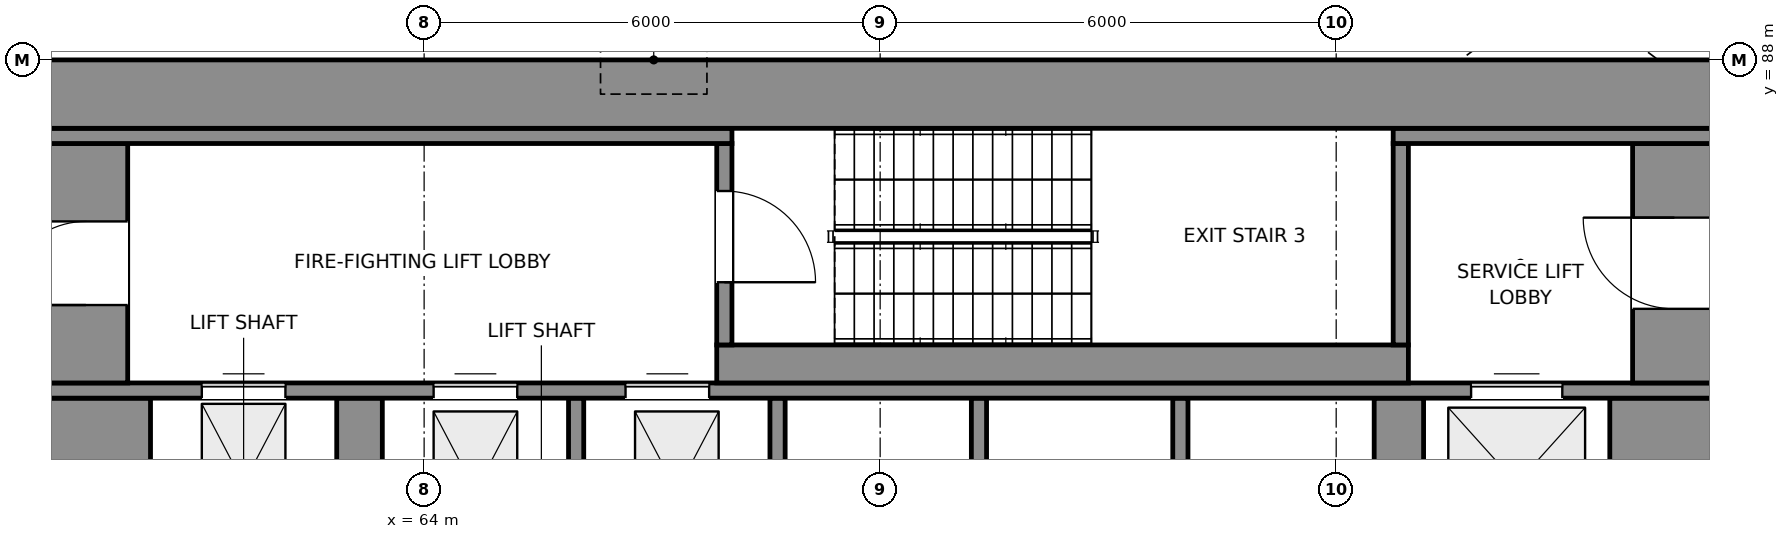
"""IFC4 building model, lengths in metres.
Left out: names, types, materials, properties, quantities, classifications, styles, units other than length and angle.
Written with IfcOpenShell. Run it as: python <this file> out.ifc"""

import sys

from ifc_helpers import new_model, si_unit, direction, frame, frame_2d, origin, place, context, subcontext, project, spatial, rectangle, extrude, element, fill, save


model = new_model("IFC4")
c1 = context("Model", 3, precision=1e-05, world=origin(), true_north=direction((0.0, 1.0)))
c2 = subcontext(c1, "Body", "Model", "MODEL_VIEW")
j1 = project(units=[si_unit("LENGTHUNIT", "METRE"), si_unit("PLANEANGLEUNIT", "RADIAN")], contexts=[c1])
p1 = place(None, origin())
s1 = spatial("IfcSite", under=j1, at=p1, CompositionType="ELEMENT")
p2 = place(p1, origin())
s2 = spatial("IfcBuilding", under=s1, at=p2, CompositionType="ELEMENT")
p3 = place(p2, frame((0.0, 0.0, 137.6)))
s3 = spatial("IfcBuildingStorey", under=s2, at=p3, CompositionType="ELEMENT", Elevation=137.6)
for number, where, z_axis, x_axis in (
    (1, (66.0, 81.1, 0.0), (0.0, 0.0, 1.0), (0.0, 1.0, 0.0)),
    (2, (68.65, 81.1, 0.0), (0.0, 0.0, 1.0), (0.0, 1.0, 0.0)),
    (3, (71.3, 81.1, 0.0), (0.0, 0.0, 1.0), (0.0, 1.0, 0.0)),
    (4, (73.95, 81.1, 0.0), (0.0, 0.0, 1.0), (0.0, 1.0, 0.0)),
):
    element("IfcWall", number, at=place(p3, frame(where, z_axis=z_axis, x_axis=x_axis)), inside=s3, PredefinedType="SHEAR", context=c2, shape_type="SweptSolid", body=[
        extrude(rectangle(XDim=2.45, YDim=0.2, at=frame_2d((1.225, 0.0))), origin(), (0.0, 0.0, 1.0), 5.0),
    ])
p4 = place(p3, frame((59.7, 81.3, 0.0), z_axis=(0.0, 0.0, 1.0), x_axis=(0.0, 1.0, 0.0)))
e5 = element("IfcWall", 5, at=p4, inside=s3, PredefinedType="SHEAR", context=c2, shape_type="SweptSolid", body=[
    extrude(rectangle(XDim=2.25, YDim=1.4, at=frame_2d((1.125, 0.0))), origin(), (0.0, 0.0, 1.0), 5.0),
])
p5 = place(p3, frame((63.15, 81.3, 0.0), z_axis=(0.0, 0.0, 1.0), x_axis=(0.0, 1.0, 0.0)))
e6 = element("IfcWall", 6, at=p5, inside=s3, PredefinedType="SHEAR", context=c2, shape_type="SweptSolid", body=[
    extrude(rectangle(XDim=2.25, YDim=0.6, at=frame_2d((1.125, 0.0))), origin(), (0.0, 0.0, 1.0), 5.0),
])
p6 = place(p3, frame((76.825, 81.3, 0.0), z_axis=(0.0, 0.0, 1.0), x_axis=(0.0, 1.0, 0.0)))
e7 = element("IfcWall", 7, at=p6, inside=s3, PredefinedType="SHEAR", context=c2, shape_type="SweptSolid", body=[
    extrude(rectangle(XDim=2.25, YDim=0.65, at=frame_2d((1.125, 0.0))), origin(), (0.0, 0.0, 1.0), 5.0),
])
p7 = place(p3, frame((80.3, 81.3, 0.0), z_axis=(0.0, 0.0, 1.0), x_axis=(0.0, 1.0, 0.0)))
e8 = element("IfcWall", 8, at=p7, inside=s3, PredefinedType="SHEAR", context=c2, shape_type="SweptSolid", body=[
    extrude(rectangle(XDim=2.25, YDim=1.4, at=frame_2d((1.125, 0.0))), origin(), (0.0, 0.0, 1.0), 5.0),
])
p8 = place(p3, frame((59.0, 83.65, 0.0), z_axis=(0.0, 0.0, 1.0), x_axis=(1.0, 0.0, 0.0)))
e9 = element("IfcWall", 9, at=p8, inside=s3, PredefinedType="SHEAR", context=c2, shape_type="SweptSolid", body=[
    extrude(rectangle(XDim=22.0, YDim=0.2, at=frame_2d((11.0, 0.0))), origin(), (0.0, 0.0, 1.0), 5.0),
])
p9 = place(p8, frame((5.125, 0.0, 0.0)))
e10 = element("IfcOpeningElement", 10, at=p9, cuts=e9, PredefinedType="OPENING", context=c2, shape_type="SweptSolid", body=[
    extrude(rectangle(XDim=1.1, YDim=2.1, at=frame_2d((0.55, 1.05))), frame((0.0, 0.11, 0.0), z_axis=(0.0, -1.0, 0.0), x_axis=(1.0, 0.0, 0.0)), (0.0, 0.0, 1.0), 0.22),
])
p10 = place(p8, frame((7.65, 0.0, 0.0)))
e11 = element("IfcOpeningElement", 11, at=p10, cuts=e9, PredefinedType="OPENING", context=c2, shape_type="SweptSolid", body=[
    extrude(rectangle(XDim=1.1, YDim=2.1, at=frame_2d((0.55, 1.05))), frame((0.0, 0.11, 0.0), z_axis=(0.0, -1.0, 0.0), x_axis=(1.0, 0.0, 0.0)), (0.0, 0.0, 1.0), 0.22),
])
p11 = place(p8, frame((18.775, 0.0, 0.0)))
e12 = element("IfcOpeningElement", 12, at=p11, cuts=e9, PredefinedType="OPENING", context=c2, shape_type="SweptSolid", body=[
    extrude(rectangle(XDim=1.2, YDim=2.1, at=frame_2d((0.6, 1.05))), frame((0.0, 0.11, 0.0), z_axis=(0.0, -1.0, 0.0), x_axis=(1.0, 0.0, 0.0)), (0.0, 0.0, 1.0), 0.22),
])
p12 = place(p8, frame((2.075, 0.0, 0.0)))
e13 = element("IfcOpeningElement", 13, at=p12, cuts=e9, PredefinedType="OPENING", context=c2, shape_type="SweptSolid", body=[
    extrude(rectangle(XDim=1.1, YDim=2.1, at=frame_2d((0.55, 1.05))), frame((0.0, 0.11, 0.0), z_axis=(0.0, -1.0, 0.0), x_axis=(1.0, 0.0, 0.0)), (0.0, 0.0, 1.0), 0.22),
])
p13 = place(p3, frame((59.55, 83.75, 0.0), z_axis=(0.0, 0.0, 1.0), x_axis=(0.0, 1.0, 0.0)))
e14 = element("IfcWall", 14, at=p13, inside=s3, PredefinedType="SHEAR", context=c2, shape_type="SweptSolid", body=[
    extrude(rectangle(XDim=3.15, YDim=1.1, at=frame_2d((1.575, 0.0))), origin(), (0.0, 0.0, 1.0), 5.0),
])
p14 = place(p13, frame((1.025, 0.0, 0.0)))
e15 = element("IfcOpeningElement", 15, at=p14, cuts=e14, PredefinedType="OPENING", context=c2, shape_type="SweptSolid", body=[
    extrude(rectangle(XDim=1.1, YDim=2.1, at=frame_2d((0.55, 1.05))), frame((0.0, 0.56, 0.0), z_axis=(0.0, -1.0, 0.0), x_axis=(1.0, 0.0, 0.0)), (0.0, 0.0, 1.0), 1.12),
])
p15 = place(p3, frame((67.85, 84.0, 0.0), z_axis=(0.0, 0.0, 1.0), x_axis=(1.0, 0.0, 0.0)))
e16 = element("IfcWall", 16, at=p15, inside=s3, PredefinedType="SHEAR", context=c2, shape_type="SweptSolid", body=[
    extrude(rectangle(XDim=9.1, YDim=0.5, at=frame_2d((4.55, 0.0))), origin(), (0.0, 0.0, 1.0), 5.0),
])
p16 = place(p3, frame((80.45, 83.75, 0.0), z_axis=(0.0, 0.0, 1.0), x_axis=(0.0, 1.0, 0.0)))
e17 = element("IfcWall", 17, at=p16, inside=s3, PredefinedType="SHEAR", context=c2, shape_type="SweptSolid", body=[
    extrude(rectangle(XDim=3.15, YDim=1.1, at=frame_2d((1.575, 0.0))), origin(), (0.0, 0.0, 1.0), 5.0),
])
p17 = place(p16, frame((0.975, 0.0, 0.0)))
e18 = element("IfcOpeningElement", 18, at=p17, cuts=e17, PredefinedType="OPENING", context=c2, shape_type="SweptSolid", body=[
    extrude(rectangle(XDim=1.2, YDim=2.1, at=frame_2d((0.6, 1.05))), frame((0.0, 0.56, 0.0), z_axis=(0.0, -1.0, 0.0), x_axis=(1.0, 0.0, 0.0)), (0.0, 0.0, 1.0), 1.12),
])
p18 = place(p3, frame((67.95, 84.25, 0.0), z_axis=(0.0, 0.0, 1.0), x_axis=(0.0, 1.0, 0.0)))
e19 = element("IfcWall", 19, at=p18, inside=s3, PredefinedType="SHEAR", context=c2, shape_type="SweptSolid", body=[
    extrude(rectangle(XDim=2.65, YDim=0.2, at=frame_2d((1.325, 0.0))), origin(), (0.0, 0.0, 1.0), 5.0),
])
p19 = place(p18, frame((0.825, 0.0, 0.0)))
e20 = element("IfcOpeningElement", 20, at=p19, cuts=e19, PredefinedType="OPENING", context=c2, shape_type="SweptSolid", body=[
    extrude(rectangle(XDim=1.2, YDim=2.1, at=frame_2d((0.6, 1.05))), frame((0.0, 0.11, 0.0), z_axis=(0.0, -1.0, 0.0), x_axis=(1.0, 0.0, 0.0)), (0.0, 0.0, 1.0), 0.22),
])
p20 = place(p3, frame((76.85, 84.25, 0.0), z_axis=(0.0, 0.0, 1.0), x_axis=(0.0, 1.0, 0.0)))
e21 = element("IfcWall", 21, at=p20, inside=s3, PredefinedType="SHEAR", context=c2, shape_type="SweptSolid", body=[
    extrude(rectangle(XDim=2.65, YDim=0.2, at=frame_2d((1.325, 0.0))), origin(), (0.0, 0.0, 1.0), 5.0),
])
p21 = place(p3, frame((59.0, 87.0, 0.0), z_axis=(0.0, 0.0, 1.0), x_axis=(1.0, 0.0, 0.0)))
e22 = element("IfcWall", 22, at=p21, inside=s3, PredefinedType="SHEAR", context=c2, shape_type="SweptSolid", body=[
    extrude(rectangle(XDim=9.05, YDim=0.2, at=frame_2d((4.525, 0.0))), origin(), (0.0, 0.0, 1.0), 5.0),
])
p22 = place(p3, frame((76.75, 87.0, 0.0), z_axis=(0.0, 0.0, 1.0), x_axis=(1.0, 0.0, 0.0)))
e23 = element("IfcWall", 23, at=p22, inside=s3, PredefinedType="SHEAR", context=c2, shape_type="SweptSolid", body=[
    extrude(rectangle(XDim=4.25, YDim=0.2, at=frame_2d((2.125, 0.0))), origin(), (0.0, 0.0, 1.0), 5.0),
])
p23 = place(p3, frame((59.0, 87.55, 0.0), z_axis=(0.0, 0.0, 1.0), x_axis=(1.0, 0.0, 0.0)))
e24 = element("IfcWall", 24, at=p23, inside=s3, PredefinedType="SHEAR", context=c2, shape_type="SweptSolid", body=[
    extrude(rectangle(XDim=22.0, YDim=0.9, at=frame_2d((11.0, 0.0))), origin(), (0.0, 0.0, 1.0), 5.0),
])
p24 = place(p19, frame((1.2, 0.0, 0.0), z_axis=(0.0, 0.0, 1.0), x_axis=(-1.0, 0.0, 0.0)))
e25 = element("IfcDoor", 25, at=p24, inside=s3, OperationType="SINGLE_SWING_RIGHT", PredefinedType="DOOR", context=c2, shape_type="SweptSolid", body=[
    extrude(rectangle(XDim=1.2, YDim=2.1, at=frame_2d((0.6, 1.05))), frame((0.0, 0.025, 0.0), z_axis=(0.0, -1.0, 0.0), x_axis=(1.0, 0.0, 0.0)), (0.0, 0.0, 1.0), 0.05),
])
fill(e20, e25)
p25 = place(p14, origin())
e26 = element("IfcDoor", 26, at=p25, inside=s3, OperationType="SINGLE_SWING_LEFT", PredefinedType="DOOR", context=c2, shape_type="SweptSolid", body=[
    extrude(rectangle(XDim=1.1, YDim=2.1, at=frame_2d((0.55, 1.05))), frame((0.0, 0.025, 0.0), z_axis=(0.0, -1.0, 0.0), x_axis=(1.0, 0.0, 0.0)), (0.0, 0.0, 1.0), 0.05),
])
fill(e15, e26)
p26 = place(p17, origin())
e27 = element("IfcDoor", 27, at=p26, inside=s3, OperationType="SINGLE_SWING_RIGHT", PredefinedType="DOOR", context=c2, shape_type="SweptSolid", body=[
    extrude(rectangle(XDim=1.2, YDim=2.1, at=frame_2d((0.6, 1.05))), frame((0.0, 0.025, 0.0), z_axis=(0.0, -1.0, 0.0), x_axis=(1.0, 0.0, 0.0)), (0.0, 0.0, 1.0), 0.05),
])
fill(e18, e27)
p27 = place(p9, origin())
e28 = element("IfcDoor", 28, at=p27, inside=s3, OperationType="DOUBLE_DOOR_SLIDING", PredefinedType="DOOR", context=c2, shape_type="SweptSolid", body=[
    extrude(rectangle(XDim=1.1, YDim=2.1, at=frame_2d((0.55, 1.05))), frame((0.0, 0.025, 0.0), z_axis=(0.0, -1.0, 0.0), x_axis=(1.0, 0.0, 0.0)), (0.0, 0.0, 1.0), 0.05),
])
fill(e10, e28)
p28 = place(p10, origin())
e29 = element("IfcDoor", 29, at=p28, inside=s3, OperationType="DOUBLE_DOOR_SLIDING", PredefinedType="DOOR", context=c2, shape_type="SweptSolid", body=[
    extrude(rectangle(XDim=1.1, YDim=2.1, at=frame_2d((0.55, 1.05))), frame((0.0, 0.025, 0.0), z_axis=(0.0, -1.0, 0.0), x_axis=(1.0, 0.0, 0.0)), (0.0, 0.0, 1.0), 0.05),
])
fill(e11, e29)
p29 = place(p11, origin())
e30 = element("IfcDoor", 30, at=p29, inside=s3, OperationType="DOUBLE_DOOR_SLIDING", PredefinedType="DOOR", context=c2, shape_type="SweptSolid", body=[
    extrude(rectangle(XDim=1.2, YDim=2.1, at=frame_2d((0.6, 1.05))), frame((0.0, 0.025, 0.0), z_axis=(0.0, -1.0, 0.0), x_axis=(1.0, 0.0, 0.0)), (0.0, 0.0, 1.0), 0.05),
])
fill(e12, e30)
p30 = place(p12, origin())
e31 = element("IfcDoor", 31, at=p30, inside=s3, OperationType="DOUBLE_DOOR_SLIDING", PredefinedType="DOOR", context=c2, shape_type="SweptSolid", body=[
    extrude(rectangle(XDim=1.1, YDim=2.1, at=frame_2d((0.55, 1.05))), frame((0.0, 0.025, 0.0), z_axis=(0.0, -1.0, 0.0), x_axis=(1.0, 0.0, 0.0)), (0.0, 0.0, 1.0), 0.05),
])
fill(e13, e31)
save(model, sys.argv[1])
